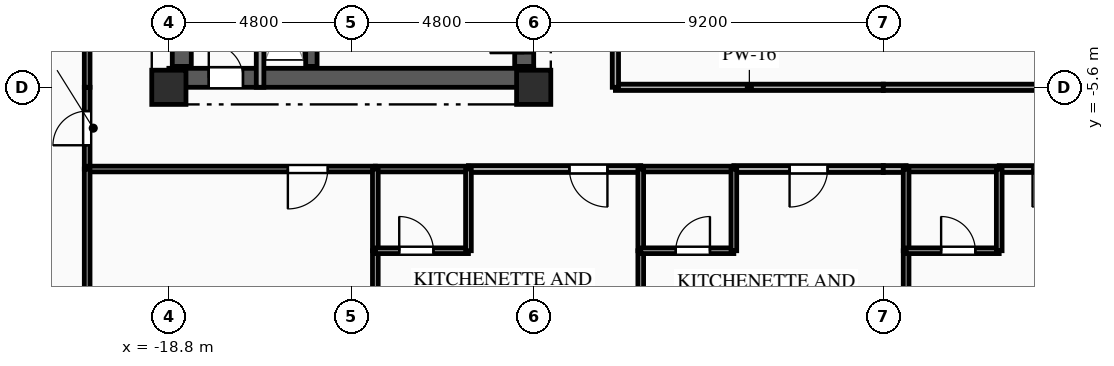
"""IFC4 building model, lengths in metres.
Left out: names, types, materials, properties, quantities, classifications, styles, units other than length and angle.
Written with IfcOpenShell. Run it as: python <this file> out.ifc"""

import sys

from ifc_helpers import new_model, si_unit, direction, frame, frame_2d, origin, origin_2d, place, context, subcontext, project, spatial, rectangle, extrude, element, fill, save


model = new_model("IFC4")
c1 = context("Model", 3, precision=1e-05, world=origin(), true_north=direction((0.0, 1.0)))
c2 = subcontext(c1, "Body", "Model", "MODEL_VIEW")
j1 = project(units=[si_unit("LENGTHUNIT", "METRE"), si_unit("PLANEANGLEUNIT", "RADIAN")], contexts=[c1])
p1 = place(None, origin())
s1 = spatial("IfcSite", under=j1, at=p1, CompositionType="ELEMENT")
p2 = place(p1, origin())
s2 = spatial("IfcBuilding", under=s1, at=p2, CompositionType="ELEMENT")
p3 = place(p2, frame((0.0, 0.0, 144.4)))
s3 = spatial("IfcBuildingStorey", under=s2, at=p3, CompositionType="ELEMENT", Elevation=144.4)
for number, where, z_axis, x_axis in (
    (1, (-18.8, -5.6, 0.0), (0.0, 0.0, 1.0), (1.0, 0.0, 0.0)),
    (2, (-9.2, -5.6, 0.0), (0.0, 0.0, 1.0), (1.0, 0.0, 0.0)),
):
    element("IfcColumn", number, at=place(p3, frame(where, z_axis=z_axis, x_axis=x_axis)), inside=s3, PredefinedType="COLUMN", context=c2, shape_type="SweptSolid", body=[
        extrude(rectangle(XDim=0.9, YDim=0.9, at=origin_2d()), origin(), (0.0, 0.0, 1.0), 3.35),
    ])
p4 = place(p3, frame((-18.8, -5.35, 0.0), z_axis=(0.0, 0.0, 1.0), x_axis=(1.0, 0.0, 0.0)))
e3 = element("IfcWall", 3, at=p4, inside=s3, PredefinedType="SHEAR", context=c2, shape_type="SweptSolid", body=[
    extrude(rectangle(XDim=9.6, YDim=0.5, at=frame_2d((4.8, 0.0))), origin(), (0.0, 0.0, 1.0), 3.04),
])
p5 = place(p4, frame((1.05, 0.0, 0.0)))
e4 = element("IfcOpeningElement", 4, at=p5, cuts=e3, PredefinedType="OPENING", context=c2, shape_type="SweptSolid", body=[
    extrude(rectangle(XDim=0.9, YDim=2.1, at=frame_2d((0.45, 1.05))), frame((0.0, 0.26, 0.0), z_axis=(0.0, -1.0, 0.0), x_axis=(1.0, 0.0, 0.0)), (0.0, 0.0, 1.0), 0.52),
])
p6 = place(p3, frame((-18.46, -5.05, 0.0), z_axis=(0.0, 0.0, 1.0), x_axis=(0.0, 1.0, 0.0)))
e5 = element("IfcWall", 5, at=p6, inside=s3, PredefinedType="SHEAR", context=c2, shape_type="SweptSolid", body=[
    extrude(rectangle(XDim=10.1, YDim=0.5, at=frame_2d((5.05, 0.0))), origin(), (0.0, 0.0, 1.0), 3.04),
])
p7 = place(p3, frame((-9.45, -5.05, 0.0), z_axis=(0.0, 0.0, 1.0), x_axis=(0.0, 1.0, 0.0)))
e6 = element("IfcWall", 6, at=p7, inside=s3, PredefinedType="SHEAR", context=c2, shape_type="SweptSolid", body=[
    extrude(rectangle(XDim=10.1, YDim=0.5, at=frame_2d((5.05, 0.0))), origin(), (0.0, 0.0, 1.0), 3.04),
])
p8 = place(p7, frame((7.175, 0.0, 0.0)))
e7 = element("IfcOpeningElement", 7, at=p8, cuts=e6, PredefinedType="OPENING", context=c2, shape_type="SweptSolid", body=[
    extrude(rectangle(XDim=0.9, YDim=2.1, at=frame_2d((0.45, 1.05))), frame((0.0, 0.26, 0.0), z_axis=(0.0, -1.0, 0.0), x_axis=(1.0, 0.0, 0.0)), (0.0, 0.0, 1.0), 0.52),
])
p9 = place(p7, frame((2.4, 0.0, 0.0)))
e8 = element("IfcOpeningElement", 8, at=p9, cuts=e6, PredefinedType="OPENING", context=c2, shape_type="SweptSolid", body=[
    extrude(rectangle(XDim=1.2, YDim=2.15, at=frame_2d((0.6, 1.075))), frame((0.0, 0.26, 0.0), z_axis=(0.0, -1.0, 0.0), x_axis=(1.0, 0.0, 0.0)), (0.0, 0.0, 1.0), 0.52),
])
p10 = place(p7, frame((0.35, 0.0, 0.0)))
e9 = element("IfcOpeningElement", 9, at=p10, cuts=e6, PredefinedType="OPENING", context=c2, shape_type="SweptSolid", body=[
    extrude(rectangle(XDim=0.9, YDim=2.1, at=frame_2d((0.45, 1.05))), frame((0.0, 0.26, 0.0), z_axis=(0.0, -1.0, 0.0), x_axis=(1.0, 0.0, 0.0)), (0.0, 0.0, 1.0), 0.52),
])
p11 = place(p7, frame((5.0, 0.0, 0.0)))
e10 = element("IfcOpeningElement", 10, at=p11, cuts=e6, PredefinedType="OPENING", context=c2, shape_type="SweptSolid", body=[
    extrude(rectangle(XDim=0.9, YDim=2.1, at=frame_2d((0.45, 1.05))), frame((0.0, 0.26, 0.0), z_axis=(0.0, -1.0, 0.0), x_axis=(1.0, 0.0, 0.0)), (0.0, 0.0, 1.0), 0.52),
])
p12 = place(p3, frame((-15.05, -5.05, 0.0), z_axis=(0.0, 0.0, 1.0), x_axis=(0.0, 1.0, 0.0)))
e11 = element("IfcWall", 11, at=p12, inside=s3, PredefinedType="SHEAR", context=c2, shape_type="SweptSolid", body=[
    extrude(rectangle(XDim=10.1, YDim=0.3, at=frame_2d((5.05, 0.0))), origin(), (0.0, 0.0, 1.0), 3.04),
])
p13 = place(p3, frame((-16.4, -5.6, 0.0), z_axis=(0.0, 0.0, 1.0), x_axis=(0.0, 1.0, 0.0)))
e12 = element("IfcWall", 12, at=p13, inside=s3, PredefinedType="PARTITIONING", context=c2, shape_type="SweptSolid", body=[
    extrude(rectangle(XDim=3.49, YDim=0.2, at=frame_2d((1.745, 0.0))), origin(), (0.0, 0.0, 1.0), 3.04),
])
p14 = place(p3, frame((-20.95, -7.75, 0.0), z_axis=(0.0, 0.0, 1.0), x_axis=(0.0, 1.0, 0.0)))
e13 = element("IfcWall", 13, at=p14, inside=s3, PredefinedType="PARTITIONING", context=c2, shape_type="SweptSolid", body=[
    extrude(rectangle(XDim=2.15, YDim=0.15, at=frame_2d((1.075, 0.0))), origin(), (0.0, 0.0, 1.0), 3.04),
])
p15 = place(p14, frame((0.625, 0.0, 0.0)))
e14 = element("IfcOpeningElement", 14, at=p15, cuts=e13, PredefinedType="OPENING", context=c2, shape_type="SweptSolid", body=[
    extrude(rectangle(XDim=0.9, YDim=2.1, at=frame_2d((0.45, 1.05))), frame((0.0, 0.085, 0.0), z_axis=(0.0, -1.0, 0.0), x_axis=(1.0, 0.0, 0.0)), (0.0, 0.0, 1.0), 0.17),
])
p16 = place(p3, frame((-13.367, -7.75, 0.0), z_axis=(0.0, 0.0, 1.0), x_axis=(-1.0, 0.0, 0.0)))
e15 = element("IfcWall", 15, at=p16, inside=s3, PredefinedType="PARTITIONING", context=c2, shape_type="SweptSolid", body=[
    extrude(rectangle(XDim=7.583, YDim=0.15, at=frame_2d((3.792, 0.0))), origin(), (0.0, 0.0, 1.0), 3.04),
])
p17 = place(p16, frame((1.252, 0.0, 0.0)))
e16 = element("IfcOpeningElement", 16, at=p17, cuts=e15, PredefinedType="OPENING", context=c2, shape_type="SweptSolid", body=[
    extrude(rectangle(XDim=1.05, YDim=2.15, at=frame_2d((0.525, 1.075))), frame((0.0, 0.085, 0.0), z_axis=(0.0, -1.0, 0.0), x_axis=(1.0, 0.0, 0.0)), (0.0, 0.0, 1.0), 0.17),
])
p18 = place(p3, frame((-6.383, -7.75, 0.0), z_axis=(0.0, 0.0, 1.0), x_axis=(-1.0, 0.0, 0.0)))
e17 = element("IfcWall", 17, at=p18, inside=s3, PredefinedType="PARTITIONING", context=c2, shape_type="SweptSolid", body=[
    extrude(rectangle(XDim=4.534, YDim=0.18, at=frame_2d((2.267, 0.0))), origin(), (0.0, 0.0, 1.0), 3.04),
])
p19 = place(p18, frame((0.877, 0.0, 0.0)))
e18 = element("IfcOpeningElement", 18, at=p19, cuts=e17, PredefinedType="OPENING", context=c2, shape_type="SweptSolid", body=[
    extrude(rectangle(XDim=1.0, YDim=2.15, at=frame_2d((0.5, 1.075))), frame((0.0, 0.1, 0.0), z_axis=(0.0, -1.0, 0.0), x_axis=(1.0, 0.0, 0.0)), (0.0, 0.0, 1.0), 0.2),
])
p20 = place(p3, frame((-10.917, -7.75, 0.0), z_axis=(0.0, 0.0, 1.0), x_axis=(-1.0, 0.0, 0.0)))
e19 = element("IfcWall", 19, at=p20, inside=s3, PredefinedType="PLUMBINGWALL", context=c2, shape_type="SweptSolid", body=[
    extrude(rectangle(XDim=2.45, YDim=0.15, at=frame_2d((1.225, 0.0))), origin(), (0.0, 0.0, 1.0), 3.04),
])
p21 = place(p3, frame((0.0, -7.75, 0.0), z_axis=(0.0, 0.0, 1.0), x_axis=(-1.0, 0.0, 0.0)))
e20 = element("IfcWall", 20, at=p21, inside=s3, PredefinedType="PARTITIONING", context=c2, shape_type="SweptSolid", body=[
    extrude(rectangle(XDim=3.933, YDim=0.18, at=frame_2d((1.967, 0.0))), origin(), (0.0, 0.0, 1.0), 3.04),
])
p22 = place(p21, frame((1.467, 0.0, 0.0)))
e21 = element("IfcOpeningElement", 21, at=p22, cuts=e20, PredefinedType="OPENING", context=c2, shape_type="SweptSolid", body=[
    extrude(rectangle(XDim=1.0, YDim=2.15, at=frame_2d((0.5, 1.075))), frame((0.0, 0.1, 0.0), z_axis=(0.0, -1.0, 0.0), x_axis=(1.0, 0.0, 0.0)), (0.0, 0.0, 1.0), 0.2),
])
p23 = place(p3, frame((-3.933, -7.75, 0.0), z_axis=(0.0, 0.0, 1.0), x_axis=(-1.0, 0.0, 0.0)))
e22 = element("IfcWall", 22, at=p23, inside=s3, PredefinedType="PLUMBINGWALL", context=c2, shape_type="SweptSolid", body=[
    extrude(rectangle(XDim=2.45, YDim=0.15, at=frame_2d((1.225, 0.0))), origin(), (0.0, 0.0, 1.0), 3.04),
])
p24 = place(p3, frame((-7.05, -5.6, 0.0), z_axis=(0.0, 0.0, 1.0), x_axis=(1.0, 0.0, 0.0)))
e23 = element("IfcWall", 23, at=p24, inside=s3, PredefinedType="PARTITIONING", context=c2, shape_type="SweptSolid", body=[
    extrude(rectangle(XDim=7.05, YDim=0.165, at=frame_2d((3.525, 0.0))), origin(), (0.0, 0.0, 1.0), 2.525),
])
p25 = place(p3, frame((0.6, -7.75, 0.0), z_axis=(0.0, 0.0, 1.0), x_axis=(-1.0, 0.0, 0.0)))
e24 = element("IfcWall", 24, at=p25, inside=s3, PredefinedType="PARTITIONING", context=c2, shape_type="SweptSolid", body=[
    extrude(rectangle(XDim=0.6, YDim=0.18, at=frame_2d((0.3, 0.0))), origin(), (0.0, 0.0, 1.0), 3.04),
])
p26 = place(p3, frame((7.583, -7.75, 0.0), z_axis=(0.0, 0.0, 1.0), x_axis=(-1.0, 0.0, 0.0)))
e25 = element("IfcWall", 25, at=p26, inside=s3, PredefinedType="PARTITIONING", context=c2, shape_type="SweptSolid", body=[
    extrude(rectangle(XDim=4.533, YDim=0.18, at=frame_2d((2.267, 0.0))), origin(), (0.0, 0.0, 1.0), 3.04),
])
p27 = place(p26, frame((2.656, 0.0, 0.0)))
e26 = element("IfcOpeningElement", 26, at=p27, cuts=e25, PredefinedType="OPENING", context=c2, shape_type="SweptSolid", body=[
    extrude(rectangle(XDim=1.0, YDim=2.15, at=frame_2d((0.5, 1.075))), frame((0.0, 0.1, 0.0), z_axis=(0.0, -1.0, 0.0), x_axis=(1.0, 0.0, 0.0)), (0.0, 0.0, 1.0), 0.2),
])
p28 = place(p3, frame((3.05, -7.75, 0.0), z_axis=(0.0, 0.0, 1.0), x_axis=(-1.0, 0.0, 0.0)))
e27 = element("IfcWall", 27, at=p28, inside=s3, PredefinedType="PLUMBINGWALL", context=c2, shape_type="SweptSolid", body=[
    extrude(rectangle(XDim=2.45, YDim=0.15, at=frame_2d((1.225, 0.0))), origin(), (0.0, 0.0, 1.0), 3.04),
])
p29 = place(p3, frame((0.0, -5.6, 0.0), z_axis=(0.0, 0.0, 1.0), x_axis=(1.0, 0.0, 0.0)))
e28 = element("IfcWall", 28, at=p29, inside=s3, PredefinedType="PARTITIONING", context=c2, shape_type="SweptSolid", body=[
    extrude(rectangle(XDim=7.05, YDim=0.165, at=frame_2d((3.525, 0.0))), origin(), (0.0, 0.0, 1.0), 2.525),
])
p30 = place(p3, frame((-20.95, -5.6, 0.0), z_axis=(0.0, 0.0, 1.0), x_axis=(0.0, 1.0, 0.0)))
e29 = element("IfcWall", 29, at=p30, inside=s3, PredefinedType="PARTITIONING", context=c2, shape_type="SweptSolid", body=[
    extrude(rectangle(XDim=2.14, YDim=0.15, at=frame_2d((1.07, 0.0))), origin(), (0.0, 0.0, 1.0), 3.04),
])
p31 = place(p3, frame((-7.05, -2.95, 0.0), z_axis=(0.0, 0.0, 1.0), x_axis=(0.0, -1.0, 0.0)))
e30 = element("IfcWall", 30, at=p31, inside=s3, PredefinedType="PARTITIONING", context=c2, shape_type="SweptSolid", body=[
    extrude(rectangle(XDim=2.65, YDim=0.165, at=frame_2d((1.325, 0.0))), origin(), (0.0, 0.0, 1.0), 3.04),
])
p32 = place(p3, frame((-20.95, -7.75, 0.0), z_axis=(0.0, 0.0, 1.0), x_axis=(0.0, -1.0, 0.0)))
e31 = element("IfcWall", 31, at=p32, inside=s3, PredefinedType="PARTITIONING", context=c2, shape_type="SweptSolid", body=[
    extrude(rectangle(XDim=7.85, YDim=0.15, at=frame_2d((3.925, 0.0))), origin(), (0.0, 0.0, 1.0), 3.04),
])
p33 = place(p3, frame((-13.367, -9.9, 0.0), z_axis=(0.0, 0.0, 1.0), x_axis=(0.0, -1.0, 0.0)))
e32 = element("IfcWall", 32, at=p33, inside=s3, PredefinedType="PARTITIONING", context=c2, shape_type="SweptSolid", body=[
    extrude(rectangle(XDim=5.7, YDim=0.15, at=frame_2d((2.85, 0.0))), origin(), (0.0, 0.0, 1.0), 3.04),
])
p34 = place(p3, frame((-13.367, -7.75, 0.0), z_axis=(0.0, 0.0, 1.0), x_axis=(0.0, -1.0, 0.0)))
e33 = element("IfcWall", 33, at=p34, inside=s3, PredefinedType="PLUMBINGWALL", context=c2, shape_type="SweptSolid", body=[
    extrude(rectangle(XDim=2.15, YDim=0.15, at=frame_2d((1.075, 0.0))), origin(), (0.0, 0.0, 1.0), 3.04),
])
p35 = place(p3, frame((-13.367, -9.9, 0.0), z_axis=(0.0, 0.0, 1.0), x_axis=(1.0, 0.0, 0.0)))
e34 = element("IfcWall", 34, at=p35, inside=s3, PredefinedType="PLUMBINGWALL", context=c2, shape_type="SweptSolid", body=[
    extrude(rectangle(XDim=2.45, YDim=0.15, at=frame_2d((1.225, 0.0))), origin(), (0.0, 0.0, 1.0), 3.04),
])
p36 = place(p35, frame((0.629, 0.0, 0.0)))
e35 = element("IfcOpeningElement", 35, at=p36, cuts=e34, PredefinedType="OPENING", context=c2, shape_type="SweptSolid", body=[
    extrude(rectangle(XDim=0.9, YDim=2.1, at=frame_2d((0.45, 1.05))), frame((0.0, 0.085, 0.0), z_axis=(0.0, -1.0, 0.0), x_axis=(1.0, 0.0, 0.0)), (0.0, 0.0, 1.0), 0.17),
])
p37 = place(p3, frame((-10.917, -9.9, 0.0), z_axis=(0.0, 0.0, 1.0), x_axis=(0.0, 1.0, 0.0)))
e36 = element("IfcWall", 36, at=p37, inside=s3, PredefinedType="PLUMBINGWALL", context=c2, shape_type="SweptSolid", body=[
    extrude(rectangle(XDim=2.15, YDim=0.15, at=frame_2d((1.075, 0.0))), origin(), (0.0, 0.0, 1.0), 3.04),
])
p38 = place(p3, frame((-6.383, -9.9, 0.0), z_axis=(0.0, 0.0, 1.0), x_axis=(0.0, -1.0, 0.0)))
e37 = element("IfcWall", 37, at=p38, inside=s3, PredefinedType="PARTITIONING", context=c2, shape_type="SweptSolid", body=[
    extrude(rectangle(XDim=5.7, YDim=0.15, at=frame_2d((2.85, 0.0))), origin(), (0.0, 0.0, 1.0), 3.04),
])
p39 = place(p3, frame((-6.383, -7.75, 0.0), z_axis=(0.0, 0.0, 1.0), x_axis=(0.0, -1.0, 0.0)))
e38 = element("IfcWall", 38, at=p39, inside=s3, PredefinedType="PLUMBINGWALL", context=c2, shape_type="SweptSolid", body=[
    extrude(rectangle(XDim=2.15, YDim=0.15, at=frame_2d((1.075, 0.0))), origin(), (0.0, 0.0, 1.0), 3.04),
])
p40 = place(p3, frame((-6.383, -9.9, 0.0), z_axis=(0.0, 0.0, 1.0), x_axis=(1.0, 0.0, 0.0)))
e39 = element("IfcWall", 39, at=p40, inside=s3, PredefinedType="PLUMBINGWALL", context=c2, shape_type="SweptSolid", body=[
    extrude(rectangle(XDim=2.45, YDim=0.15, at=frame_2d((1.225, 0.0))), origin(), (0.0, 0.0, 1.0), 3.04),
])
p41 = place(p40, frame((0.921, 0.0, 0.0)))
e40 = element("IfcOpeningElement", 40, at=p41, cuts=e39, PredefinedType="OPENING", context=c2, shape_type="SweptSolid", body=[
    extrude(rectangle(XDim=0.9, YDim=2.1, at=frame_2d((0.45, 1.05))), frame((0.0, 0.085, 0.0), z_axis=(0.0, -1.0, 0.0), x_axis=(1.0, 0.0, 0.0)), (0.0, 0.0, 1.0), 0.17),
])
p42 = place(p3, frame((-3.933, -9.9, 0.0), z_axis=(0.0, 0.0, 1.0), x_axis=(0.0, 1.0, 0.0)))
e41 = element("IfcWall", 41, at=p42, inside=s3, PredefinedType="PLUMBINGWALL", context=c2, shape_type="SweptSolid", body=[
    extrude(rectangle(XDim=2.15, YDim=0.15, at=frame_2d((1.075, 0.0))), origin(), (0.0, 0.0, 1.0), 3.04),
])
p43 = place(p3, frame((0.6, -9.9, 0.0), z_axis=(0.0, 0.0, 1.0), x_axis=(0.0, -1.0, 0.0)))
e42 = element("IfcWall", 42, at=p43, inside=s3, PredefinedType="PARTITIONING", context=c2, shape_type="SweptSolid", body=[
    extrude(rectangle(XDim=5.7, YDim=0.15, at=frame_2d((2.85, 0.0))), origin(), (0.0, 0.0, 1.0), 3.04),
])
p44 = place(p3, frame((0.6, -7.75, 0.0), z_axis=(0.0, 0.0, 1.0), x_axis=(0.0, -1.0, 0.0)))
e43 = element("IfcWall", 43, at=p44, inside=s3, PredefinedType="PLUMBINGWALL", context=c2, shape_type="SweptSolid", body=[
    extrude(rectangle(XDim=2.15, YDim=0.15, at=frame_2d((1.075, 0.0))), origin(), (0.0, 0.0, 1.0), 3.04),
])
p45 = place(p3, frame((0.6, -9.9, 0.0), z_axis=(0.0, 0.0, 1.0), x_axis=(1.0, 0.0, 0.0)))
e44 = element("IfcWall", 44, at=p45, inside=s3, PredefinedType="PLUMBINGWALL", context=c2, shape_type="SweptSolid", body=[
    extrude(rectangle(XDim=2.45, YDim=0.15, at=frame_2d((1.225, 0.0))), origin(), (0.0, 0.0, 1.0), 3.04),
])
p46 = place(p45, frame((0.921, 0.0, 0.0)))
e45 = element("IfcOpeningElement", 45, at=p46, cuts=e44, PredefinedType="OPENING", context=c2, shape_type="SweptSolid", body=[
    extrude(rectangle(XDim=0.9, YDim=2.1, at=frame_2d((0.45, 1.05))), frame((0.0, 0.085, 0.0), z_axis=(0.0, -1.0, 0.0), x_axis=(1.0, 0.0, 0.0)), (0.0, 0.0, 1.0), 0.17),
])
p47 = place(p3, frame((3.05, -9.9, 0.0), z_axis=(0.0, 0.0, 1.0), x_axis=(0.0, 1.0, 0.0)))
e46 = element("IfcWall", 46, at=p47, inside=s3, PredefinedType="PLUMBINGWALL", context=c2, shape_type="SweptSolid", body=[
    extrude(rectangle(XDim=2.15, YDim=0.15, at=frame_2d((1.075, 0.0))), origin(), (0.0, 0.0, 1.0), 3.04),
])
p48 = place(p5, origin())
e47 = element("IfcDoor", 47, at=p48, inside=s3, OperationType="SINGLE_SWING_LEFT", PredefinedType="DOOR", context=c2, shape_type="SweptSolid", body=[
    extrude(rectangle(XDim=0.9, YDim=2.1, at=frame_2d((0.45, 1.05))), frame((0.0, 0.025, 0.0), z_axis=(0.0, -1.0, 0.0), x_axis=(1.0, 0.0, 0.0)), (0.0, 0.0, 1.0), 0.05),
])
fill(e4, e47)
p49 = place(p10, origin())
e48 = element("IfcDoor", 48, at=p49, inside=s3, OperationType="SINGLE_SWING_LEFT", PredefinedType="DOOR", context=c2, shape_type="SweptSolid", body=[
    extrude(rectangle(XDim=0.9, YDim=2.1, at=frame_2d((0.45, 1.05))), frame((0.0, 0.025, 0.0), z_axis=(0.0, -1.0, 0.0), x_axis=(1.0, 0.0, 0.0)), (0.0, 0.0, 1.0), 0.05),
])
fill(e9, e48)
p50 = place(p15, origin())
e49 = element("IfcDoor", 49, at=p50, inside=s3, OperationType="SINGLE_SWING_LEFT", PredefinedType="DOOR", context=c2, shape_type="SweptSolid", body=[
    extrude(rectangle(XDim=0.9, YDim=2.1, at=frame_2d((0.45, 1.05))), frame((0.0, 0.025, 0.0), z_axis=(0.0, -1.0, 0.0), x_axis=(1.0, 0.0, 0.0)), (0.0, 0.0, 1.0), 0.05),
])
fill(e14, e49)
p51 = place(p17, origin())
e50 = element("IfcDoor", 50, at=p51, inside=s3, OperationType="SINGLE_SWING_RIGHT", PredefinedType="DOOR", context=c2, shape_type="SweptSolid", body=[
    extrude(rectangle(XDim=1.05, YDim=2.15, at=frame_2d((0.525, 1.075))), frame((0.0, 0.025, 0.0), z_axis=(0.0, -1.0, 0.0), x_axis=(1.0, 0.0, 0.0)), (0.0, 0.0, 1.0), 0.05),
])
fill(e16, e50)
p52 = place(p19, origin())
e51 = element("IfcDoor", 51, at=p52, inside=s3, OperationType="SINGLE_SWING_LEFT", PredefinedType="DOOR", context=c2, shape_type="SweptSolid", body=[
    extrude(rectangle(XDim=1.0, YDim=2.15, at=frame_2d((0.5, 1.075))), frame((0.0, 0.025, 0.0), z_axis=(0.0, -1.0, 0.0), x_axis=(1.0, 0.0, 0.0)), (0.0, 0.0, 1.0), 0.05),
])
fill(e18, e51)
p53 = place(p22, origin())
e52 = element("IfcDoor", 52, at=p53, inside=s3, OperationType="SINGLE_SWING_RIGHT", PredefinedType="DOOR", context=c2, shape_type="SweptSolid", body=[
    extrude(rectangle(XDim=1.0, YDim=2.15, at=frame_2d((0.5, 1.075))), frame((0.0, 0.025, 0.0), z_axis=(0.0, -1.0, 0.0), x_axis=(1.0, 0.0, 0.0)), (0.0, 0.0, 1.0), 0.05),
])
fill(e21, e52)
p54 = place(p27, origin())
e53 = element("IfcDoor", 53, at=p54, inside=s3, OperationType="SINGLE_SWING_RIGHT", PredefinedType="DOOR", context=c2, shape_type="SweptSolid", body=[
    extrude(rectangle(XDim=1.0, YDim=2.15, at=frame_2d((0.5, 1.075))), frame((0.0, 0.025, 0.0), z_axis=(0.0, -1.0, 0.0), x_axis=(1.0, 0.0, 0.0)), (0.0, 0.0, 1.0), 0.05),
])
fill(e26, e53)
p55 = place(p36, origin())
e54 = element("IfcDoor", 54, at=p55, inside=s3, OperationType="SINGLE_SWING_LEFT", PredefinedType="DOOR", context=c2, shape_type="SweptSolid", body=[
    extrude(rectangle(XDim=0.9, YDim=2.1, at=frame_2d((0.45, 1.05))), frame((0.0, 0.025, 0.0), z_axis=(0.0, -1.0, 0.0), x_axis=(1.0, 0.0, 0.0)), (0.0, 0.0, 1.0), 0.05),
])
fill(e35, e54)
p56 = place(p41, origin())
e55 = element("IfcDoor", 55, at=p56, inside=s3, OperationType="SINGLE_SWING_RIGHT", PredefinedType="DOOR", context=c2, shape_type="SweptSolid", body=[
    extrude(rectangle(XDim=0.9, YDim=2.1, at=frame_2d((0.45, 1.05))), frame((0.0, 0.025, 0.0), z_axis=(0.0, -1.0, 0.0), x_axis=(1.0, 0.0, 0.0)), (0.0, 0.0, 1.0), 0.05),
])
fill(e40, e55)
p57 = place(p46, origin())
e56 = element("IfcDoor", 56, at=p57, inside=s3, OperationType="SINGLE_SWING_LEFT", PredefinedType="DOOR", context=c2, shape_type="SweptSolid", body=[
    extrude(rectangle(XDim=0.9, YDim=2.1, at=frame_2d((0.45, 1.05))), frame((0.0, 0.025, 0.0), z_axis=(0.0, -1.0, 0.0), x_axis=(1.0, 0.0, 0.0)), (0.0, 0.0, 1.0), 0.05),
])
fill(e45, e56)
save(model, sys.argv[1])
